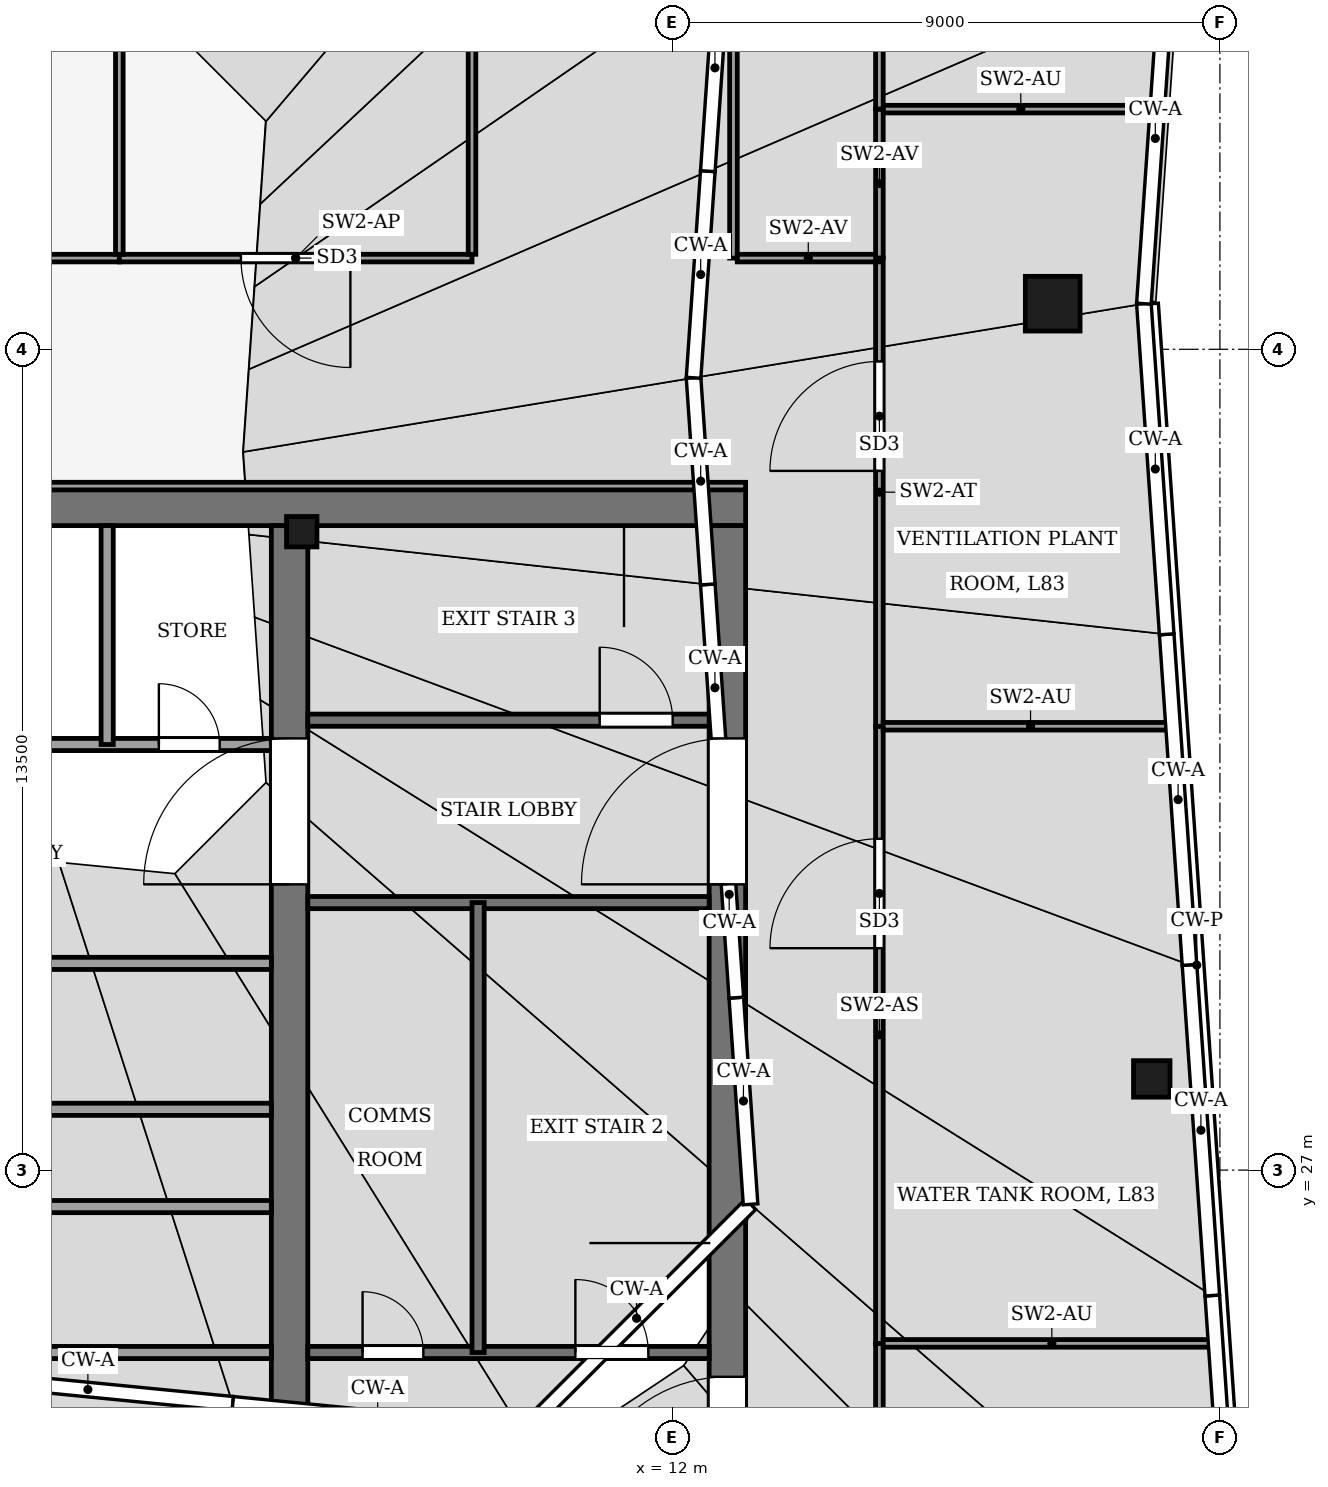
"""IFC4 building model, lengths in metres.
Left out: names, types, materials, properties, quantities, classifications, styles, units other than length and angle.
Written with IfcOpenShell. Run it as: python <this file> out.ifc"""

import sys

from ifc_helpers import new_model, si_unit, direction, frame, frame_2d, origin, origin_2d, place, context, subcontext, project, spatial, rectangle, hollow_rectangle, extrude, element, fill, save


model = new_model("IFC4")
c1 = context("Model", 3, precision=1e-05, world=origin(), true_north=direction((0.0, 1.0)))
c2 = subcontext(c1, "Body", "Model", "MODEL_VIEW")
j1 = project(units=[si_unit("LENGTHUNIT", "METRE"), si_unit("PLANEANGLEUNIT", "RADIAN")], contexts=[c1])
p1 = place(None, origin())
s1 = spatial("IfcSite", under=j1, at=p1, CompositionType="ELEMENT")
p2 = place(p1, origin())
s2 = spatial("IfcBuilding", under=s1, at=p2, CompositionType="ELEMENT")
p3 = place(p2, frame((0.0, 0.0, 368.0)))
s3 = spatial("IfcBuildingStorey", under=s2, at=p3, CompositionType="ELEMENT", Elevation=368.0)
p4 = place(p3, frame((-13.2, 37.9, -0.15), z_axis=(0.0, 0.0, 1.0), x_axis=(1.0, 0.0, 0.0)))
e1 = element("IfcWall", 1, at=p4, inside=s3, PredefinedType="SHEAR", context=c2, shape_type="SweptSolid", body=[
    extrude(rectangle(XDim=26.4, YDim=0.6, at=frame_2d((13.2, 0.0))), origin(), (0.0, 0.0, 1.0), 3.45),
])
p5 = place(p3, frame((12.9, 18.4, -0.15), z_axis=(0.0, 0.0, 1.0), x_axis=(0.0, 1.0, 0.0)))
e2 = element("IfcWall", 2, at=p5, inside=s3, PredefinedType="SHEAR", context=c2, shape_type="SweptSolid", body=[
    extrude(rectangle(XDim=19.2, YDim=0.6, at=frame_2d((9.6, 0.0))), origin(), (0.0, 0.0, 1.0), 3.45),
])
p6 = place(p5, frame((2.8, 0.0, 0.15)))
e3 = element("IfcOpeningElement", 3, at=p6, cuts=e2, PredefinedType="OPENING", context=c2, shape_type="SweptSolid", body=[
    extrude(rectangle(XDim=2.4, YDim=2.4, at=frame_2d((1.2, 1.2))), frame((0.0, 0.31, 0.0), z_axis=(0.0, -1.0, 0.0), x_axis=(1.0, 0.0, 0.0)), (0.0, 0.0, 1.0), 0.62),
])
p7 = place(p5, frame((13.3, 0.0, 0.15)))
e4 = element("IfcOpeningElement", 4, at=p7, cuts=e2, PredefinedType="OPENING", context=c2, shape_type="SweptSolid", body=[
    extrude(rectangle(XDim=2.4, YDim=2.4, at=frame_2d((1.2, 1.2))), frame((0.0, 0.31, 0.0), z_axis=(0.0, -1.0, 0.0), x_axis=(1.0, 0.0, 0.0)), (0.0, 0.0, 1.0), 0.62),
])
p8 = place(p3, frame((5.7, 18.4, -0.15), z_axis=(0.0, 0.0, 1.0), x_axis=(0.0, 1.0, 0.0)))
e5 = element("IfcWall", 5, at=p8, inside=s3, PredefinedType="SHEAR", context=c2, shape_type="SweptSolid", body=[
    extrude(rectangle(XDim=19.2, YDim=0.6, at=frame_2d((9.6, 0.0))), origin(), (0.0, 0.0, 1.0), 3.45),
])
p9 = place(p8, frame((13.3, 0.0, 0.15)))
e6 = element("IfcOpeningElement", 6, at=p9, cuts=e5, PredefinedType="OPENING", context=c2, shape_type="SweptSolid", body=[
    extrude(rectangle(XDim=2.4, YDim=2.4, at=frame_2d((1.2, 1.2))), frame((0.0, 0.31, 0.0), z_axis=(0.0, -1.0, 0.0), x_axis=(1.0, 0.0, 0.0)), (0.0, 0.0, 1.0), 0.62),
])
p10 = place(p3, frame((18.25, 41.25, 0.0), z_axis=(0.0, 0.0, 1.0), x_axis=(1.0, 0.0, 0.0)))
e7 = element("IfcColumn", 7, at=p10, inside=s3, PredefinedType="COLUMN", context=c2, shape_type="SweptSolid", body=[
    extrude(hollow_rectangle(XDim=0.9, YDim=0.9, WallThickness=0.04, at=origin_2d()), origin(), (0.0, 0.0, 1.0), 3.3),
])
p11 = place(p3, frame((19.879, 28.5, 0.0), z_axis=(0.0, 0.0, 1.0), x_axis=(1.0, 0.0, 0.0)))
e8 = element("IfcColumn", 8, at=p11, inside=s3, PredefinedType="COLUMN", context=c2, shape_type="SweptSolid", body=[
    extrude(hollow_rectangle(XDim=0.6, YDim=0.6, WallThickness=0.025, at=origin_2d()), origin(), (0.0, 0.0, 1.0), 3.3),
])
p12 = place(p3, frame((5.9, 37.5, 3.5), z_axis=(0.0, 0.0, 1.0), x_axis=(1.0, 0.0, 0.0)))
e9 = element("IfcColumn", 9, at=p12, inside=s3, PredefinedType="COLUMN", context=c2, shape_type="SweptSolid", body=[
    extrude(rectangle(XDim=0.5, YDim=0.5, at=origin_2d()), origin(), (0.0, 0.0, 1.0), 0.8),
])
p13 = place(p3, frame((-5.4, 24.0, 0.0), z_axis=(0.0, 0.0, 1.0), x_axis=(1.0, 0.0, 0.0)))
e10 = element("IfcWall", 10, at=p13, inside=s3, PredefinedType="PARTITIONING", context=c2, shape_type="SweptSolid", body=[
    extrude(rectangle(XDim=10.8, YDim=0.2, at=frame_2d((5.4, 0.0))), origin(), (0.0, 0.0, 1.0), 3.3),
])
p14 = place(p13, frame((4.9, 0.0, 0.0)))
e11 = element("IfcOpeningElement", 11, at=p14, cuts=e10, PredefinedType="OPENING", context=c2, shape_type="SweptSolid", body=[
    extrude(rectangle(XDim=1.0, YDim=2.1, at=frame_2d((0.5, 1.05))), frame((0.0, 0.11, 0.0), z_axis=(0.0, -1.0, 0.0), x_axis=(1.0, 0.0, 0.0)), (0.0, 0.0, 1.0), 0.22),
])
p15 = place(p3, frame((6.0, 24.0, 0.0), z_axis=(0.0, 0.0, 1.0), x_axis=(1.0, 0.0, 0.0)))
e12 = element("IfcWall", 12, at=p15, inside=s3, PredefinedType="PARTITIONING", context=c2, shape_type="SweptSolid", body=[
    extrude(rectangle(XDim=6.6, YDim=0.2, at=frame_2d((3.3, 0.0))), origin(), (0.0, 0.0, 1.0), 3.3),
])
p16 = place(p15, frame((0.9, 0.0, 0.0)))
e13 = element("IfcOpeningElement", 13, at=p16, cuts=e12, PredefinedType="OPENING", context=c2, shape_type="SweptSolid", body=[
    extrude(rectangle(XDim=1.0, YDim=2.1, at=frame_2d((0.5, 1.05))), frame((0.0, 0.11, 0.0), z_axis=(0.0, -1.0, 0.0), x_axis=(1.0, 0.0, 0.0)), (0.0, 0.0, 1.0), 0.22),
])
p17 = place(p15, frame((4.4, 0.0, 0.0)))
e14 = element("IfcOpeningElement", 14, at=p17, cuts=e12, PredefinedType="OPENING", context=c2, shape_type="SweptSolid", body=[
    extrude(rectangle(XDim=1.2, YDim=2.2, at=frame_2d((0.6, 1.1))), frame((0.0, 0.11, 0.0), z_axis=(0.0, -1.0, 0.0), x_axis=(1.0, 0.0, 0.0)), (0.0, 0.0, 1.0), 0.22),
])
for number, where, z_axis, x_axis in (
    (15, (-5.4, 26.4, 0.0), (0.0, 0.0, 1.0), (1.0, 0.0, 0.0)),
    (16, (-5.4, 28.0, 0.0), (0.0, 0.0, 1.0), (1.0, 0.0, 0.0)),
):
    element("IfcWall", number, at=place(p3, frame(where, z_axis=z_axis, x_axis=x_axis)), inside=s3, PredefinedType="PARTITIONING", context=c2, shape_type="SweptSolid", body=[
        extrude(rectangle(XDim=10.8, YDim=0.2, at=frame_2d((5.4, 0.0))), origin(), (0.0, 0.0, 1.0), 3.3),
    ])
p18 = place(p3, frame((-5.4, 30.4, 0.0), z_axis=(0.0, 0.0, 1.0), x_axis=(1.0, 0.0, 0.0)))
e17 = element("IfcWall", 17, at=p18, inside=s3, PredefinedType="PARTITIONING", context=c2, shape_type="SweptSolid", body=[
    extrude(rectangle(XDim=10.8, YDim=0.2, at=frame_2d((5.4, 0.0))), origin(), (0.0, 0.0, 1.0), 3.3),
])
p19 = place(p18, frame((4.9, 0.0, 0.0)))
e18 = element("IfcOpeningElement", 18, at=p19, cuts=e17, PredefinedType="OPENING", context=c2, shape_type="SweptSolid", body=[
    extrude(rectangle(XDim=1.0, YDim=2.1, at=frame_2d((0.5, 1.05))), frame((0.0, 0.11, 0.0), z_axis=(0.0, -1.0, 0.0), x_axis=(1.0, 0.0, 0.0)), (0.0, 0.0, 1.0), 0.22),
])
p20 = place(p3, frame((6.0, 31.4, 0.0), z_axis=(0.0, 0.0, 1.0), x_axis=(1.0, 0.0, 0.0)))
e19 = element("IfcWall", 19, at=p20, inside=s3, PredefinedType="PARTITIONING", context=c2, shape_type="SweptSolid", body=[
    extrude(rectangle(XDim=6.6, YDim=0.2, at=frame_2d((3.3, 0.0))), origin(), (0.0, 0.0, 1.0), 3.3),
])
p21 = place(p3, frame((-5.4, 34.0, 0.0), z_axis=(0.0, 0.0, 1.0), x_axis=(1.0, 0.0, 0.0)))
e20 = element("IfcWall", 20, at=p21, inside=s3, PredefinedType="PARTITIONING", context=c2, shape_type="SweptSolid", body=[
    extrude(rectangle(XDim=10.8, YDim=0.2, at=frame_2d((5.4, 0.0))), origin(), (0.0, 0.0, 1.0), 3.3),
])
p22 = place(p21, frame((3.55, 0.0, 0.0)))
e21 = element("IfcOpeningElement", 21, at=p22, cuts=e20, PredefinedType="OPENING", context=c2, shape_type="SweptSolid", body=[
    extrude(rectangle(XDim=1.0, YDim=2.1, at=frame_2d((0.5, 1.05))), frame((0.0, 0.11, 0.0), z_axis=(0.0, -1.0, 0.0), x_axis=(1.0, 0.0, 0.0)), (0.0, 0.0, 1.0), 0.22),
])
p23 = place(p21, frame((8.95, 0.0, 0.0)))
e22 = element("IfcOpeningElement", 22, at=p23, cuts=e20, PredefinedType="OPENING", context=c2, shape_type="SweptSolid", body=[
    extrude(rectangle(XDim=1.0, YDim=2.1, at=frame_2d((0.5, 1.05))), frame((0.0, 0.11, 0.0), z_axis=(0.0, -1.0, 0.0), x_axis=(1.0, 0.0, 0.0)), (0.0, 0.0, 1.0), 0.22),
])
p24 = place(p3, frame((6.0, 34.4, 0.0), z_axis=(0.0, 0.0, 1.0), x_axis=(1.0, 0.0, 0.0)))
e23 = element("IfcWall", 23, at=p24, inside=s3, PredefinedType="PARTITIONING", context=c2, shape_type="SweptSolid", body=[
    extrude(rectangle(XDim=6.6, YDim=0.2, at=frame_2d((3.3, 0.0))), origin(), (0.0, 0.0, 1.0), 3.3),
])
p25 = place(p24, frame((4.8, 0.0, 0.0)))
e24 = element("IfcOpeningElement", 24, at=p25, cuts=e23, PredefinedType="OPENING", context=c2, shape_type="SweptSolid", body=[
    extrude(rectangle(XDim=1.2, YDim=2.2, at=frame_2d((0.6, 1.1))), frame((0.0, 0.11, 0.0), z_axis=(0.0, -1.0, 0.0), x_axis=(1.0, 0.0, 0.0)), (0.0, 0.0, 1.0), 0.22),
])
p26 = place(p3, frame((2.7, 34.0, 0.0), z_axis=(0.0, 0.0, 1.0), x_axis=(0.0, 1.0, 0.0)))
e25 = element("IfcWall", 25, at=p26, inside=s3, PredefinedType="PARTITIONING", context=c2, shape_type="SweptSolid", body=[
    extrude(rectangle(XDim=3.6, YDim=0.2, at=frame_2d((1.8, 0.0))), origin(), (0.0, 0.0, 1.0), 3.3),
])
p27 = place(p3, frame((8.8, 24.0, 0.0), z_axis=(0.0, 0.0, 1.0), x_axis=(0.0, 1.0, 0.0)))
e26 = element("IfcWall", 26, at=p27, inside=s3, PredefinedType="PARTITIONING", context=c2, shape_type="SweptSolid", body=[
    extrude(rectangle(XDim=7.4, YDim=0.2, at=frame_2d((3.7, 0.0))), origin(), (0.0, 0.0, 1.0), 3.3),
])
p28 = place(p3, frame((2.9, 42.0, 0.0), z_axis=(0.0, 0.0, 1.0), x_axis=(-1.0, 0.0, 0.0)))
e27 = element("IfcWall", 27, at=p28, inside=s3, PredefinedType="PARTITIONING", context=c2, shape_type="SweptSolid", body=[
    extrude(rectangle(XDim=5.8, YDim=0.125, at=frame_2d((2.9, 0.0))), origin(), (0.0, 0.0, 1.0), 2.82),
])
p29 = place(p28, frame((2.4, 0.0, 0.0)))
e28 = element("IfcOpeningElement", 28, at=p29, cuts=e27, PredefinedType="OPENING", context=c2, shape_type="SweptSolid", body=[
    extrude(rectangle(XDim=1.0, YDim=2.1, at=frame_2d((0.5, 1.05))), frame((0.0, 0.073, 0.0), z_axis=(0.0, -1.0, 0.0), x_axis=(1.0, 0.0, 0.0)), (0.0, 0.0, 1.0), 0.145),
])
p30 = place(p3, frame((8.7, 42.0, 0.0), z_axis=(0.0, 0.0, 1.0), x_axis=(-1.0, 0.0, 0.0)))
e29 = element("IfcWall", 29, at=p30, inside=s3, PredefinedType="PARTITIONING", context=c2, shape_type="SweptSolid", body=[
    extrude(rectangle(XDim=5.8, YDim=0.125, at=frame_2d((2.9, 0.0))), origin(), (0.0, 0.0, 1.0), 2.82),
])
p31 = place(p30, frame((2.0, 0.0, 0.0)))
e30 = element("IfcOpeningElement", 30, at=p31, cuts=e29, PredefinedType="OPENING", context=c2, shape_type="SweptSolid", body=[
    extrude(rectangle(XDim=1.8, YDim=2.4, at=frame_2d((0.9, 1.2))), frame((0.0, 0.073, 0.0), z_axis=(0.0, -1.0, 0.0), x_axis=(1.0, 0.0, 0.0)), (0.0, 0.0, 1.0), 0.145),
])
p32 = place(p3, frame((8.7, 42.062, 0.0), z_axis=(0.0, 0.0, 1.0), x_axis=(0.0, 1.0, 0.0)))
e31 = element("IfcWall", 31, at=p32, inside=s3, PredefinedType="PARTITIONING", context=c2, shape_type="SweptSolid", body=[
    extrude(rectangle(XDim=12.538, YDim=0.125, at=frame_2d((6.269, 0.0))), origin(), (0.0, 0.0, 1.0), 2.67),
])
p33 = place(p3, frame((15.4, 13.45, 0.0), z_axis=(0.0, 0.0, 1.0), x_axis=(0.0, 1.0, 0.0)))
e32 = element("IfcWall", 32, at=p33, inside=s3, PredefinedType="PARTITIONING", context=c2, shape_type="SweptSolid", body=[
    extrude(rectangle(XDim=10.7, YDim=0.125, at=frame_2d((5.35, 0.0))), origin(), (0.0, 0.0, 1.0), 2.262),
])
p34 = place(p33, frame((5.139, 0.0, 0.0)))
e33 = element("IfcOpeningElement", 33, at=p34, cuts=e32, PredefinedType="OPENING", context=c2, shape_type="SweptSolid", body=[
    extrude(rectangle(XDim=1.0, YDim=2.1, at=frame_2d((0.5, 1.05))), frame((0.0, 0.073, 0.0), z_axis=(0.0, -1.0, 0.0), x_axis=(1.0, 0.0, 0.0)), (0.0, 0.0, 1.0), 0.145),
])
p35 = place(p3, frame((15.4, 24.15, 0.0), z_axis=(0.0, 0.0, 1.0), x_axis=(0.0, 1.0, 0.0)))
e34 = element("IfcWall", 34, at=p35, inside=s3, PredefinedType="PARTITIONING", context=c2, shape_type="SweptSolid", body=[
    extrude(rectangle(XDim=10.15, YDim=0.125, at=frame_2d((5.075, 0.0))), origin(), (0.0, 0.0, 1.0), 2.97),
])
p36 = place(p35, frame((6.5, 0.0, 0.0)))
e35 = element("IfcOpeningElement", 35, at=p36, cuts=e34, PredefinedType="OPENING", context=c2, shape_type="SweptSolid", body=[
    extrude(rectangle(XDim=1.8, YDim=2.4, at=frame_2d((0.9, 1.2))), frame((0.0, 0.073, 0.0), z_axis=(0.0, -1.0, 0.0), x_axis=(1.0, 0.0, 0.0)), (0.0, 0.0, 1.0), 0.145),
])
p37 = place(p3, frame((15.4, 34.3, 0.0), z_axis=(0.0, 0.0, 1.0), x_axis=(0.0, 1.0, 0.0)))
e36 = element("IfcWall", 36, at=p37, inside=s3, PredefinedType="PARTITIONING", context=c2, shape_type="SweptSolid", body=[
    extrude(rectangle(XDim=7.7, YDim=0.125, at=frame_2d((3.85, 0.0))), origin(), (0.0, 0.0, 1.0), 2.57),
])
p38 = place(p37, frame((4.2, 0.0, 0.0)))
e37 = element("IfcOpeningElement", 37, at=p38, cuts=e36, PredefinedType="OPENING", context=c2, shape_type="SweptSolid", body=[
    extrude(rectangle(XDim=1.8, YDim=2.4, at=frame_2d((0.9, 1.2))), frame((0.0, 0.073, 0.0), z_axis=(0.0, -1.0, 0.0), x_axis=(1.0, 0.0, 0.0)), (0.0, 0.0, 1.0), 0.145),
])
p39 = place(p3, frame((2.9, 54.538, 0.0), z_axis=(0.0, 0.0, 1.0), x_axis=(0.0, -1.0, 0.0)))
e38 = element("IfcWall", 38, at=p39, inside=s3, PredefinedType="PARTITIONING", context=c2, shape_type="SweptSolid", body=[
    extrude(rectangle(XDim=12.475, YDim=0.125, at=frame_2d((6.238, 0.0))), origin(), (0.0, 0.0, 1.0), 2.67),
])
p40 = place(p3, frame((15.462, 24.15, 0.0), z_axis=(0.0, 0.0, 1.0), x_axis=(1.0, 0.0, 0.0)))
e39 = element("IfcWall", 39, at=p40, inside=s3, PredefinedType="PARTITIONING", context=c2, shape_type="SweptSolid", body=[
    extrude(rectangle(XDim=5.547, YDim=0.125, at=frame_2d((2.773, 0.0))), origin(), (0.0, 0.0, 1.0), 2.47),
])
p41 = place(p3, frame((15.462, 34.3, 0.0), z_axis=(0.0, 0.0, 1.0), x_axis=(1.0, 0.0, 0.0)))
e40 = element("IfcWall", 40, at=p41, inside=s3, PredefinedType="PARTITIONING", context=c2, shape_type="SweptSolid", body=[
    extrude(rectangle(XDim=4.847, YDim=0.125, at=frame_2d((2.423, 0.0))), origin(), (0.0, 0.0, 1.0), 2.47),
])
p42 = place(p3, frame((15.4, 44.45, 0.0), z_axis=(0.0, 0.0, 1.0), x_axis=(1.0, 0.0, 0.0)))
e41 = element("IfcWall", 41, at=p42, inside=s3, PredefinedType="PARTITIONING", context=c2, shape_type="SweptSolid", body=[
    extrude(rectangle(XDim=4.651, YDim=0.125, at=frame_2d((2.325, 0.0))), origin(), (0.0, 0.0, 1.0), 2.47),
])
p43 = place(p3, frame((13.2, 38.25, 0.0), z_axis=(0.0, 0.0, 1.0), x_axis=(-1.0, 0.0, 0.0)))
e42 = element("IfcWall", 42, at=p43, inside=s3, PredefinedType="PARTITIONING", context=c2, shape_type="SweptSolid", body=[
    extrude(rectangle(XDim=26.4, YDim=0.125, at=frame_2d((13.2, 0.0))), origin(), (0.0, 0.0, 1.0), 2.82),
])
p44 = place(p3, frame((13.0, 54.538, 0.0), z_axis=(0.0, 0.0, 1.0), x_axis=(0.0, -1.0, 0.0)))
e43 = element("IfcWall", 43, at=p44, inside=s3, PredefinedType="PARTITIONING", context=c2, shape_type="SweptSolid", body=[
    extrude(rectangle(XDim=12.538, YDim=0.125, at=frame_2d((6.269, 0.0))), origin(), (0.0, 0.0, 1.0), 2.78),
])
p45 = place(p3, frame((13.062, 42.0, 0.0), z_axis=(0.0, 0.0, 1.0), x_axis=(1.0, 0.0, 0.0)))
e44 = element("IfcWall", 44, at=p45, inside=s3, PredefinedType="PARTITIONING", context=c2, shape_type="SweptSolid", body=[
    extrude(rectangle(XDim=2.335, YDim=0.125, at=frame_2d((1.168, 0.0))), origin(), (0.0, 0.0, 1.0), 3.3),
])
p46 = place(p3, frame((15.4, 42.002, 0.0), z_axis=(0.0, 0.0, 1.0), x_axis=(0.0, 1.0, 0.0)))
e45 = element("IfcWall", 45, at=p46, inside=s3, PredefinedType="PARTITIONING", context=c2, shape_type="SweptSolid", body=[
    extrude(rectangle(XDim=2.446, YDim=0.125, at=frame_2d((1.223, 0.0))), origin(), (0.0, 0.0, 1.0), 3.3),
])
p47 = place(p3, frame((15.4, 44.452, 0.0), z_axis=(0.0, 0.0, 1.0), x_axis=(0.0, 1.0, 0.0)))
e46 = element("IfcWall", 46, at=p47, inside=s3, PredefinedType="PARTITIONING", context=c2, shape_type="SweptSolid", body=[
    extrude(rectangle(XDim=10.146, YDim=0.125, at=frame_2d((5.073, 0.0))), origin(), (0.0, 0.0, 1.0), 2.78),
])
p48 = place(p16, origin())
e47 = element("IfcDoor", 47, at=p48, inside=s3, OperationType="SINGLE_SWING_RIGHT", PredefinedType="DOOR", context=c2, shape_type="SweptSolid", body=[
    extrude(rectangle(XDim=1.0, YDim=2.1, at=frame_2d((0.5, 1.05))), frame((0.0, 0.025, 0.0), z_axis=(0.0, -1.0, 0.0), x_axis=(1.0, 0.0, 0.0)), (0.0, 0.0, 1.0), 0.05),
])
fill(e13, e47)
p49 = place(p23, origin())
e48 = element("IfcDoor", 48, at=p49, inside=s3, OperationType="SINGLE_SWING_LEFT", PredefinedType="DOOR", context=c2, shape_type="SweptSolid", body=[
    extrude(rectangle(XDim=1.0, YDim=2.1, at=frame_2d((0.5, 1.05))), frame((0.0, 0.025, 0.0), z_axis=(0.0, -1.0, 0.0), x_axis=(1.0, 0.0, 0.0)), (0.0, 0.0, 1.0), 0.05),
])
fill(e22, e48)
p50 = place(p17, origin())
e49 = element("IfcDoor", 49, at=p50, inside=s3, OperationType="SINGLE_SWING_RIGHT", PredefinedType="DOOR", context=c2, shape_type="SweptSolid", body=[
    extrude(rectangle(XDim=1.2, YDim=2.2, at=frame_2d((0.6, 1.1))), frame((0.0, 0.025, 0.0), z_axis=(0.0, -1.0, 0.0), x_axis=(1.0, 0.0, 0.0)), (0.0, 0.0, 1.0), 0.05),
])
fill(e14, e49)
p51 = place(p25, origin())
e50 = element("IfcDoor", 50, at=p51, inside=s3, OperationType="SINGLE_SWING_LEFT", PredefinedType="DOOR", context=c2, shape_type="SweptSolid", body=[
    extrude(rectangle(XDim=1.2, YDim=2.2, at=frame_2d((0.6, 1.1))), frame((0.0, 0.025, 0.0), z_axis=(0.0, -1.0, 0.0), x_axis=(1.0, 0.0, 0.0)), (0.0, 0.0, 1.0), 0.05),
])
fill(e24, e50)
p52 = place(p9, origin())
e51 = element("IfcDoor", 51, at=p52, inside=s3, OperationType="DOUBLE_DOOR_SINGLE_SWING", PredefinedType="DOOR", context=c2, shape_type="SweptSolid", body=[
    extrude(rectangle(XDim=2.4, YDim=2.4, at=frame_2d((1.2, 1.2))), frame((0.0, 0.025, 0.0), z_axis=(0.0, -1.0, 0.0), x_axis=(1.0, 0.0, 0.0)), (0.0, 0.0, 1.0), 0.05),
])
fill(e6, e51)
p53 = place(p6, origin())
e52 = element("IfcDoor", 52, at=p53, inside=s3, OperationType="DOUBLE_DOOR_SINGLE_SWING", PredefinedType="DOOR", context=c2, shape_type="SweptSolid", body=[
    extrude(rectangle(XDim=2.4, YDim=2.4, at=frame_2d((1.2, 1.2))), frame((0.0, 0.025, 0.0), z_axis=(0.0, -1.0, 0.0), x_axis=(1.0, 0.0, 0.0)), (0.0, 0.0, 1.0), 0.05),
])
fill(e3, e52)
p54 = place(p7, origin())
e53 = element("IfcDoor", 53, at=p54, inside=s3, OperationType="DOUBLE_DOOR_SINGLE_SWING", PredefinedType="DOOR", context=c2, shape_type="SweptSolid", body=[
    extrude(rectangle(XDim=2.4, YDim=2.4, at=frame_2d((1.2, 1.2))), frame((0.0, 0.025, 0.0), z_axis=(0.0, -1.0, 0.0), x_axis=(1.0, 0.0, 0.0)), (0.0, 0.0, 1.0), 0.05),
])
fill(e4, e53)
p55 = place(p31, origin())
e54 = element("IfcDoor", 54, at=p55, inside=s3, OperationType="DOUBLE_DOOR_SINGLE_SWING", PredefinedType="DOOR", context=c2, shape_type="SweptSolid", body=[
    extrude(rectangle(XDim=1.8, YDim=2.4, at=frame_2d((0.9, 1.2))), frame((0.0, 0.025, 0.0), z_axis=(0.0, -1.0, 0.0), x_axis=(1.0, 0.0, 0.0)), (0.0, 0.0, 1.0), 0.05),
])
fill(e30, e54)
p56 = place(p36, origin())
e55 = element("IfcDoor", 55, at=p56, inside=s3, OperationType="DOUBLE_DOOR_SINGLE_SWING", PredefinedType="DOOR", context=c2, shape_type="SweptSolid", body=[
    extrude(rectangle(XDim=1.8, YDim=2.4, at=frame_2d((0.9, 1.2))), frame((0.0, 0.025, 0.0), z_axis=(0.0, -1.0, 0.0), x_axis=(1.0, 0.0, 0.0)), (0.0, 0.0, 1.0), 0.05),
])
fill(e35, e55)
p57 = place(p38, origin())
e56 = element("IfcDoor", 56, at=p57, inside=s3, OperationType="DOUBLE_DOOR_SINGLE_SWING", PredefinedType="DOOR", context=c2, shape_type="SweptSolid", body=[
    extrude(rectangle(XDim=1.8, YDim=2.4, at=frame_2d((0.9, 1.2))), frame((0.0, 0.025, 0.0), z_axis=(0.0, -1.0, 0.0), x_axis=(1.0, 0.0, 0.0)), (0.0, 0.0, 1.0), 0.05),
])
fill(e37, e56)
save(model, sys.argv[1])
